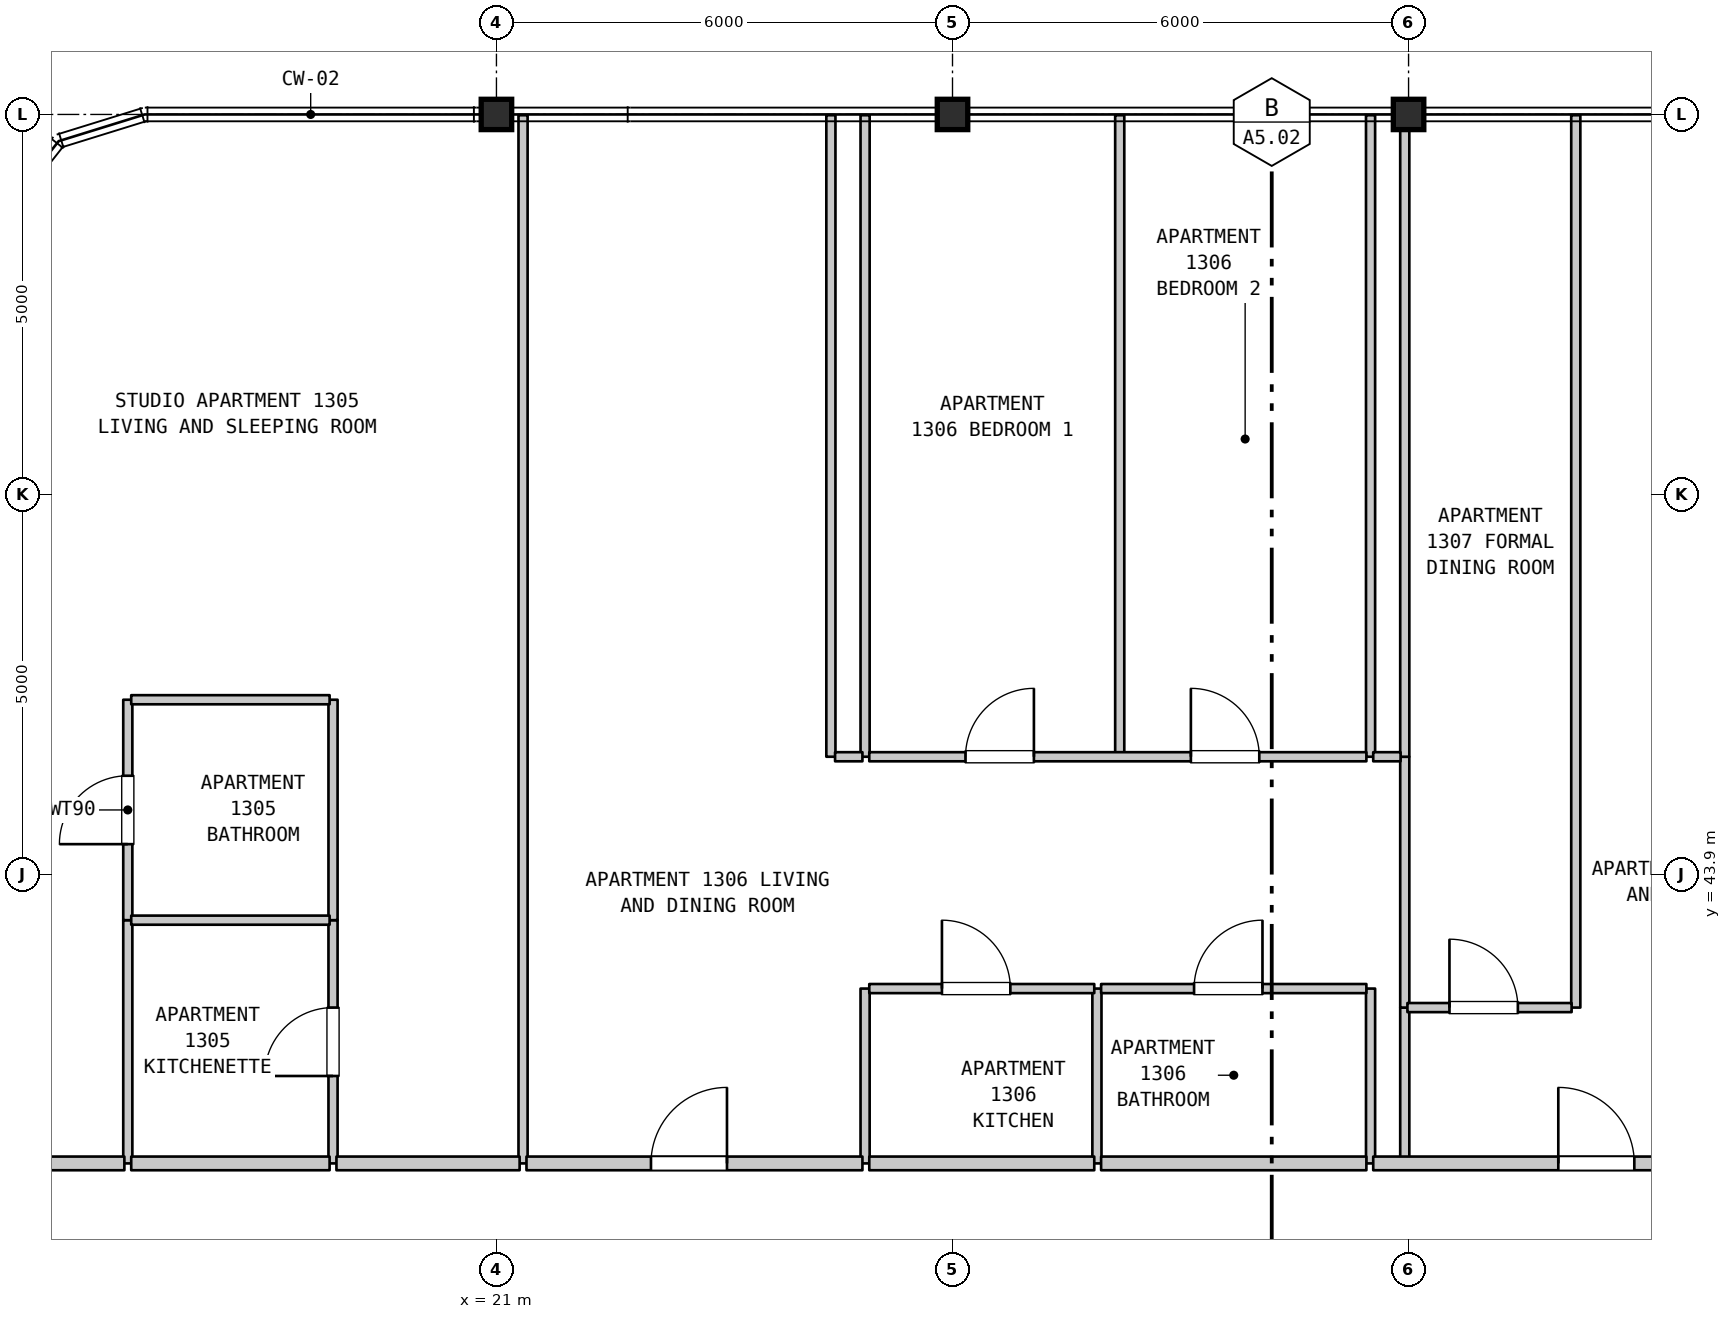
"""IFC4 building model, lengths in metres.
Left out: names, types, materials, properties, quantities, classifications, styles, units other than length and angle.
Written with IfcOpenShell. Run it as: python <this file> out.ifc"""

import sys

from ifc_helpers import new_model, si_unit, direction, frame, frame_2d, origin, origin_2d, place, context, subcontext, project, spatial, rectangle, i_section, extrude, element, fill, save


model = new_model("IFC4")
c1 = context("Model", 3, precision=1e-05, world=origin(), true_north=direction((0.0, 1.0)))
c2 = subcontext(c1, "Body", "Model", "MODEL_VIEW")
j1 = project(units=[si_unit("LENGTHUNIT", "METRE"), si_unit("PLANEANGLEUNIT", "RADIAN")], contexts=[c1])
p1 = place(None, origin())
s1 = spatial("IfcSite", under=j1, at=p1, CompositionType="ELEMENT")
p2 = place(p1, origin())
s2 = spatial("IfcBuilding", under=s1, at=p2, CompositionType="ELEMENT")
p3 = place(p2, frame((0.0, 0.0, 57.3)))
s3 = spatial("IfcBuildingStorey", under=s2, at=p3, CompositionType="ELEMENT", Elevation=57.3)
for number, where, z_axis, x_axis in (
    (1, (21.0, 53.9, 0.0), (0.0, 0.0, 1.0), (1.0, 0.0, 0.0)),
    (2, (27.0, 53.9, 0.0), (0.0, 0.0, 1.0), (1.0, 0.0, 0.0)),
    (3, (33.0, 53.9, 0.0), (0.0, 0.0, 1.0), (1.0, 0.0, 0.0)),
):
    element("IfcColumn", number, at=place(p3, frame(where, z_axis=z_axis, x_axis=x_axis)), inside=s3, PredefinedType="COLUMN", context=c2, shape_type="SweptSolid", body=[
        extrude(i_section(OverallWidth=0.401, OverallDepth=0.399, WebThickness=0.025, FlangeThickness=0.04, FilletRadius=0.015, at=origin_2d()), origin(), (0.0, 0.0, 1.0), 3.7),
    ])
p4 = place(p3, frame((16.15, 40.1, 0.0), z_axis=(0.0, 0.0, 1.0), x_axis=(0.0, 1.0, 0.0)))
e4 = element("IfcWall", 4, at=p4, inside=s3, PredefinedType="PARTITIONING", context=c2, shape_type="SweptSolid", body=[
    extrude(rectangle(XDim=3.2, YDim=0.12, at=frame_2d((1.6, 0.0))), origin(), (0.0, 0.0, 1.0), 3.28),
])
p5 = place(p3, frame((16.15, 43.3, 0.0), z_axis=(0.0, 0.0, 1.0), x_axis=(0.0, 1.0, 0.0)))
e5 = element("IfcWall", 5, at=p5, inside=s3, PredefinedType="PARTITIONING", context=c2, shape_type="SweptSolid", body=[
    extrude(rectangle(XDim=2.9, YDim=0.12, at=frame_2d((1.45, 0.0))), origin(), (0.0, 0.0, 1.0), 3.28),
])
p6 = place(p5, frame((1.0, 0.0, 0.0)))
e6 = element("IfcOpeningElement", 6, at=p6, cuts=e5, PredefinedType="OPENING", context=c2, shape_type="SweptSolid", body=[
    extrude(rectangle(XDim=0.9, YDim=2.1, at=frame_2d((0.45, 1.05))), frame((0.0, 0.07, 0.0), z_axis=(0.0, -1.0, 0.0), x_axis=(1.0, 0.0, 0.0)), (0.0, 0.0, 1.0), 0.14),
])
p7 = place(p3, frame((18.85, 40.1, 0.0), z_axis=(0.0, 0.0, 1.0), x_axis=(0.0, 1.0, 0.0)))
e7 = element("IfcWall", 7, at=p7, inside=s3, PredefinedType="PARTITIONING", context=c2, shape_type="SweptSolid", body=[
    extrude(rectangle(XDim=3.2, YDim=0.12, at=frame_2d((1.6, 0.0))), origin(), (0.0, 0.0, 1.0), 3.28),
])
p8 = place(p7, frame((1.15, 0.0, 0.0)))
e8 = element("IfcOpeningElement", 8, at=p8, cuts=e7, PredefinedType="OPENING", context=c2, shape_type="SweptSolid", body=[
    extrude(rectangle(XDim=0.9, YDim=2.15, at=frame_2d((0.45, 1.075))), frame((0.0, 0.07, 0.0), z_axis=(0.0, -1.0, 0.0), x_axis=(1.0, 0.0, 0.0)), (0.0, 0.0, 1.0), 0.14),
])
p9 = place(p3, frame((18.85, 43.3, 0.0), z_axis=(0.0, 0.0, 1.0), x_axis=(0.0, 1.0, 0.0)))
e9 = element("IfcWall", 9, at=p9, inside=s3, PredefinedType="PARTITIONING", context=c2, shape_type="SweptSolid", body=[
    extrude(rectangle(XDim=2.9, YDim=0.12, at=frame_2d((1.45, 0.0))), origin(), (0.0, 0.0, 1.0), 3.28),
])
p10 = place(p3, frame((21.35, 40.1, 0.0), z_axis=(0.0, 0.0, 1.0), x_axis=(0.0, 1.0, 0.0)))
e10 = element("IfcWall", 10, at=p10, inside=s3, PredefinedType="PARTITIONING", context=c2, shape_type="SweptSolid", body=[
    extrude(rectangle(XDim=13.79, YDim=0.12, at=frame_2d((6.895, 0.0))), origin(), (0.0, 0.0, 1.0), 3.28),
])
p11 = place(p3, frame((25.4, 45.45, 0.0), z_axis=(0.0, 0.0, 1.0), x_axis=(0.0, 1.0, 0.0)))
e11 = element("IfcWall", 11, at=p11, inside=s3, PredefinedType="PARTITIONING", context=c2, shape_type="SweptSolid", body=[
    extrude(rectangle(XDim=8.44, YDim=0.12, at=frame_2d((4.22, 0.0))), origin(), (0.0, 0.0, 1.0), 3.28),
])
p12 = place(p3, frame((25.85, 40.1, 0.0), z_axis=(0.0, 0.0, 1.0), x_axis=(0.0, 1.0, 0.0)))
e12 = element("IfcWall", 12, at=p12, inside=s3, PredefinedType="PARTITIONING", context=c2, shape_type="SweptSolid", body=[
    extrude(rectangle(XDim=2.3, YDim=0.12, at=frame_2d((1.15, 0.0))), origin(), (0.0, 0.0, 1.0), 3.28),
])
p13 = place(p3, frame((25.85, 45.45, 0.0), z_axis=(0.0, 0.0, 1.0), x_axis=(0.0, 1.0, 0.0)))
e13 = element("IfcWall", 13, at=p13, inside=s3, PredefinedType="PARTITIONING", context=c2, shape_type="SweptSolid", body=[
    extrude(rectangle(XDim=8.44, YDim=0.12, at=frame_2d((4.22, 0.0))), origin(), (0.0, 0.0, 1.0), 3.28),
])
p14 = place(p3, frame((28.9, 40.1, 0.0), z_axis=(0.0, 0.0, 1.0), x_axis=(0.0, 1.0, 0.0)))
e14 = element("IfcWall", 14, at=p14, inside=s3, PredefinedType="PARTITIONING", context=c2, shape_type="SweptSolid", body=[
    extrude(rectangle(XDim=2.3, YDim=0.12, at=frame_2d((1.15, 0.0))), origin(), (0.0, 0.0, 1.0), 3.28),
])
p15 = place(p3, frame((29.2, 45.45, 0.0), z_axis=(0.0, 0.0, 1.0), x_axis=(0.0, 1.0, 0.0)))
e15 = element("IfcWall", 15, at=p15, inside=s3, PredefinedType="PARTITIONING", context=c2, shape_type="SweptSolid", body=[
    extrude(rectangle(XDim=8.44, YDim=0.12, at=frame_2d((4.22, 0.0))), origin(), (0.0, 0.0, 1.0), 3.28),
])
p16 = place(p3, frame((32.5, 40.1, 0.0), z_axis=(0.0, 0.0, 1.0), x_axis=(0.0, 1.0, 0.0)))
e16 = element("IfcWall", 16, at=p16, inside=s3, PredefinedType="PARTITIONING", context=c2, shape_type="SweptSolid", body=[
    extrude(rectangle(XDim=2.3, YDim=0.12, at=frame_2d((1.15, 0.0))), origin(), (0.0, 0.0, 1.0), 3.28),
])
p17 = place(p3, frame((32.5, 45.45, 0.0), z_axis=(0.0, 0.0, 1.0), x_axis=(0.0, 1.0, 0.0)))
e17 = element("IfcWall", 17, at=p17, inside=s3, PredefinedType="PARTITIONING", context=c2, shape_type="SweptSolid", body=[
    extrude(rectangle(XDim=8.44, YDim=0.12, at=frame_2d((4.22, 0.0))), origin(), (0.0, 0.0, 1.0), 3.28),
])
p18 = place(p3, frame((32.95, 40.1, 0.0), z_axis=(0.0, 0.0, 1.0), x_axis=(0.0, 1.0, 0.0)))
e18 = element("IfcWall", 18, at=p18, inside=s3, PredefinedType="PARTITIONING", context=c2, shape_type="SweptSolid", body=[
    extrude(rectangle(XDim=2.05, YDim=0.12, at=frame_2d((1.025, 0.0))), origin(), (0.0, 0.0, 1.0), 2.68),
])
p19 = place(p3, frame((32.95, 42.15, 0.0), z_axis=(0.0, 0.0, 1.0), x_axis=(0.0, 1.0, 0.0)))
e19 = element("IfcWall", 19, at=p19, inside=s3, PredefinedType="PARTITIONING", context=c2, shape_type="SweptSolid", body=[
    extrude(rectangle(XDim=3.3, YDim=0.12, at=frame_2d((1.65, 0.0))), origin(), (0.0, 0.0, 1.0), 2.68),
])
p20 = place(p3, frame((32.95, 45.45, 0.0), z_axis=(0.0, 0.0, 1.0), x_axis=(0.0, 1.0, 0.0)))
e20 = element("IfcWall", 20, at=p20, inside=s3, PredefinedType="PARTITIONING", context=c2, shape_type="SweptSolid", body=[
    extrude(rectangle(XDim=8.44, YDim=0.12, at=frame_2d((4.22, 0.0))), origin(), (0.0, 0.0, 1.0), 2.68),
])
p21 = place(p3, frame((35.2, 42.15, 0.0), z_axis=(0.0, 0.0, 1.0), x_axis=(0.0, 1.0, 0.0)))
e21 = element("IfcWall", 21, at=p21, inside=s3, PredefinedType="PARTITIONING", context=c2, shape_type="SweptSolid", body=[
    extrude(rectangle(XDim=11.74, YDim=0.12, at=frame_2d((5.87, 0.0))), origin(), (0.0, 0.0, 1.0), 3.28),
])
p22 = place(p3, frame((12.875, 40.1, 0.0), z_axis=(0.0, 0.0, 1.0), x_axis=(1.0, 0.0, 0.0)))
e22 = element("IfcWall", 22, at=p22, inside=s3, PredefinedType="STANDARD", context=c2, shape_type="SweptSolid", body=[
    extrude(rectangle(XDim=3.23, YDim=0.18, at=frame_2d((1.615, 0.0))), origin(), (0.0, 0.0, 1.0), 3.28),
])
p23 = place(p22, frame((1.029, 0.0, 0.0)))
e23 = element("IfcOpeningElement", 23, at=p23, cuts=e22, PredefinedType="OPENING", context=c2, shape_type="SweptSolid", body=[
    extrude(rectangle(XDim=1.0, YDim=2.15, at=frame_2d((0.5, 1.075))), frame((0.0, 0.1, 0.0), z_axis=(0.0, -1.0, 0.0), x_axis=(1.0, 0.0, 0.0)), (0.0, 0.0, 1.0), 0.2),
])
p24 = place(p3, frame((16.195, 40.1, 0.0), z_axis=(0.0, 0.0, 1.0), x_axis=(1.0, 0.0, 0.0)))
e24 = element("IfcWall", 24, at=p24, inside=s3, PredefinedType="STANDARD", context=c2, shape_type="SweptSolid", body=[
    extrude(rectangle(XDim=2.61, YDim=0.18, at=frame_2d((1.305, 0.0))), origin(), (0.0, 0.0, 1.0), 3.28),
])
p25 = place(p3, frame((18.895, 40.1, 0.0), z_axis=(0.0, 0.0, 1.0), x_axis=(1.0, 0.0, 0.0)))
e25 = element("IfcWall", 25, at=p25, inside=s3, PredefinedType="STANDARD", context=c2, shape_type="SweptSolid", body=[
    extrude(rectangle(XDim=2.41, YDim=0.18, at=frame_2d((1.205, 0.0))), origin(), (0.0, 0.0, 1.0), 3.28),
])
p26 = place(p3, frame((21.395, 40.1, 0.0), z_axis=(0.0, 0.0, 1.0), x_axis=(1.0, 0.0, 0.0)))
e26 = element("IfcWall", 26, at=p26, inside=s3, PredefinedType="STANDARD", context=c2, shape_type="SweptSolid", body=[
    extrude(rectangle(XDim=4.42, YDim=0.18, at=frame_2d((2.21, 0.0))), origin(), (0.0, 0.0, 1.0), 3.28),
])
p27 = place(p26, frame((1.638, 0.0, 0.0)))
e27 = element("IfcOpeningElement", 27, at=p27, cuts=e26, PredefinedType="OPENING", context=c2, shape_type="SweptSolid", body=[
    extrude(rectangle(XDim=1.0, YDim=2.15, at=frame_2d((0.5, 1.075))), frame((0.0, 0.1, 0.0), z_axis=(0.0, -1.0, 0.0), x_axis=(1.0, 0.0, 0.0)), (0.0, 0.0, 1.0), 0.2),
])
p28 = place(p3, frame((25.905, 40.1, 0.0), z_axis=(0.0, 0.0, 1.0), x_axis=(1.0, 0.0, 0.0)))
e28 = element("IfcWall", 28, at=p28, inside=s3, PredefinedType="STANDARD", context=c2, shape_type="SweptSolid", body=[
    extrude(rectangle(XDim=2.96, YDim=0.18, at=frame_2d((1.48, 0.0))), origin(), (0.0, 0.0, 1.0), 3.28),
])
p29 = place(p3, frame((28.955, 40.1, 0.0), z_axis=(0.0, 0.0, 1.0), x_axis=(1.0, 0.0, 0.0)))
e29 = element("IfcWall", 29, at=p29, inside=s3, PredefinedType="STANDARD", context=c2, shape_type="SweptSolid", body=[
    extrude(rectangle(XDim=3.49, YDim=0.18, at=frame_2d((1.745, 0.0))), origin(), (0.0, 0.0, 1.0), 3.28),
])
p30 = place(p3, frame((32.535, 40.1, 0.0), z_axis=(0.0, 0.0, 1.0), x_axis=(1.0, 0.0, 0.0)))
e30 = element("IfcWall", 30, at=p30, inside=s3, PredefinedType="STANDARD", context=c2, shape_type="SweptSolid", body=[
    extrude(rectangle(XDim=5.545, YDim=0.18, at=frame_2d((2.772, 0.0))), origin(), (0.0, 0.0, 1.0), 3.28),
])
p31 = place(p30, frame((2.435, 0.0, 0.0)))
e31 = element("IfcOpeningElement", 31, at=p31, cuts=e30, PredefinedType="OPENING", context=c2, shape_type="SweptSolid", body=[
    extrude(rectangle(XDim=1.0, YDim=2.15, at=frame_2d((0.5, 1.075))), frame((0.0, 0.1, 0.0), z_axis=(0.0, -1.0, 0.0), x_axis=(1.0, 0.0, 0.0)), (0.0, 0.0, 1.0), 0.2),
])
p32 = place(p3, frame((32.985, 42.15, 0.0), z_axis=(0.0, 0.0, 1.0), x_axis=(1.0, 0.0, 0.0)))
e32 = element("IfcWall", 32, at=p32, inside=s3, PredefinedType="PARTITIONING", context=c2, shape_type="SweptSolid", body=[
    extrude(rectangle(XDim=2.16, YDim=0.12, at=frame_2d((1.08, 0.0))), origin(), (0.0, 0.0, 1.0), 3.28),
])
p33 = place(p32, frame((0.553, 0.0, 0.0)))
e33 = element("IfcOpeningElement", 33, at=p33, cuts=e32, PredefinedType="OPENING", context=c2, shape_type="SweptSolid", body=[
    extrude(rectangle(XDim=0.9, YDim=2.15, at=frame_2d((0.45, 1.075))), frame((0.0, 0.07, 0.0), z_axis=(0.0, -1.0, 0.0), x_axis=(1.0, 0.0, 0.0)), (0.0, 0.0, 1.0), 0.14),
])
p34 = place(p3, frame((25.905, 42.4, 0.0), z_axis=(0.0, 0.0, 1.0), x_axis=(1.0, 0.0, 0.0)))
e34 = element("IfcWall", 34, at=p34, inside=s3, PredefinedType="PARTITIONING", context=c2, shape_type="SweptSolid", body=[
    extrude(rectangle(XDim=2.96, YDim=0.12, at=frame_2d((1.48, 0.0))), origin(), (0.0, 0.0, 1.0), 3.28),
])
p35 = place(p34, frame((0.956, 0.0, 0.0)))
e35 = element("IfcOpeningElement", 35, at=p35, cuts=e34, PredefinedType="OPENING", context=c2, shape_type="SweptSolid", body=[
    extrude(rectangle(XDim=0.9, YDim=2.15, at=frame_2d((0.45, 1.075))), frame((0.0, 0.07, 0.0), z_axis=(0.0, -1.0, 0.0), x_axis=(1.0, 0.0, 0.0)), (0.0, 0.0, 1.0), 0.14),
])
p36 = place(p3, frame((28.955, 42.4, 0.0), z_axis=(0.0, 0.0, 1.0), x_axis=(1.0, 0.0, 0.0)))
e36 = element("IfcWall", 36, at=p36, inside=s3, PredefinedType="PARTITIONING", context=c2, shape_type="SweptSolid", body=[
    extrude(rectangle(XDim=3.49, YDim=0.12, at=frame_2d((1.745, 0.0))), origin(), (0.0, 0.0, 1.0), 3.28),
])
p37 = place(p36, frame((1.223, 0.0, 0.0)))
e37 = element("IfcOpeningElement", 37, at=p37, cuts=e36, PredefinedType="OPENING", context=c2, shape_type="SweptSolid", body=[
    extrude(rectangle(XDim=0.9, YDim=2.1, at=frame_2d((0.45, 1.05))), frame((0.0, 0.07, 0.0), z_axis=(0.0, -1.0, 0.0), x_axis=(1.0, 0.0, 0.0)), (0.0, 0.0, 1.0), 0.14),
])
p38 = place(p3, frame((16.195, 43.3, 0.0), z_axis=(0.0, 0.0, 1.0), x_axis=(1.0, 0.0, 0.0)))
e38 = element("IfcWall", 38, at=p38, inside=s3, PredefinedType="PARTITIONING", context=c2, shape_type="SweptSolid", body=[
    extrude(rectangle(XDim=2.61, YDim=0.12, at=frame_2d((1.305, 0.0))), origin(), (0.0, 0.0, 1.0), 3.28),
])
p39 = place(p3, frame((25.455, 45.45, 0.0), z_axis=(0.0, 0.0, 1.0), x_axis=(1.0, 0.0, 0.0)))
e39 = element("IfcWall", 39, at=p39, inside=s3, PredefinedType="PARTITIONING", context=c2, shape_type="SweptSolid", body=[
    extrude(rectangle(XDim=0.36, YDim=0.12, at=frame_2d((0.18, 0.0))), origin(), (0.0, 0.0, 1.0), 3.28),
])
p40 = place(p3, frame((25.905, 45.45, 0.0), z_axis=(0.0, 0.0, 1.0), x_axis=(1.0, 0.0, 0.0)))
e40 = element("IfcWall", 40, at=p40, inside=s3, PredefinedType="PARTITIONING", context=c2, shape_type="SweptSolid", body=[
    extrude(rectangle(XDim=6.54, YDim=0.12, at=frame_2d((3.27, 0.0))), origin(), (0.0, 0.0, 1.0), 3.28),
])
p41 = place(p40, frame((1.266, 0.0, 0.0)))
e41 = element("IfcOpeningElement", 41, at=p41, cuts=e40, PredefinedType="OPENING", context=c2, shape_type="SweptSolid", body=[
    extrude(rectangle(XDim=0.9, YDim=2.15, at=frame_2d((0.45, 1.075))), frame((0.0, 0.07, 0.0), z_axis=(0.0, -1.0, 0.0), x_axis=(1.0, 0.0, 0.0)), (0.0, 0.0, 1.0), 0.14),
])
p42 = place(p40, frame((4.231, 0.0, 0.0)))
e42 = element("IfcOpeningElement", 42, at=p42, cuts=e40, PredefinedType="OPENING", context=c2, shape_type="SweptSolid", body=[
    extrude(rectangle(XDim=0.9, YDim=2.15, at=frame_2d((0.45, 1.075))), frame((0.0, 0.07, 0.0), z_axis=(0.0, -1.0, 0.0), x_axis=(1.0, 0.0, 0.0)), (0.0, 0.0, 1.0), 0.14),
])
p43 = place(p3, frame((32.535, 45.45, 0.0), z_axis=(0.0, 0.0, 1.0), x_axis=(1.0, 0.0, 0.0)))
e43 = element("IfcWall", 43, at=p43, inside=s3, PredefinedType="PARTITIONING", context=c2, shape_type="SweptSolid", body=[
    extrude(rectangle(XDim=0.36, YDim=0.12, at=frame_2d((0.18, 0.0))), origin(), (0.0, 0.0, 1.0), 3.28),
])
p44 = place(p3, frame((16.195, 46.2, 0.0), z_axis=(0.0, 0.0, 1.0), x_axis=(1.0, 0.0, 0.0)))
e44 = element("IfcWall", 44, at=p44, inside=s3, PredefinedType="PARTITIONING", context=c2, shape_type="SweptSolid", body=[
    extrude(rectangle(XDim=2.61, YDim=0.12, at=frame_2d((1.305, 0.0))), origin(), (0.0, 0.0, 1.0), 3.28),
])
p45 = place(p6, origin())
e45 = element("IfcDoor", 45, at=p45, inside=s3, OperationType="SINGLE_SWING_LEFT", PredefinedType="DOOR", context=c2, shape_type="SweptSolid", body=[
    extrude(rectangle(XDim=0.9, YDim=2.1, at=frame_2d((0.45, 1.05))), frame((0.0, 0.025, 0.0), z_axis=(0.0, -1.0, 0.0), x_axis=(1.0, 0.0, 0.0)), (0.0, 0.0, 1.0), 0.05),
])
fill(e6, e45)
p46 = place(p8, origin())
e46 = element("IfcDoor", 46, at=p46, inside=s3, OperationType="SINGLE_SWING_LEFT", PredefinedType="DOOR", context=c2, shape_type="SweptSolid", body=[
    extrude(rectangle(XDim=0.9, YDim=2.15, at=frame_2d((0.45, 1.075))), frame((0.0, 0.025, 0.0), z_axis=(0.0, -1.0, 0.0), x_axis=(1.0, 0.0, 0.0)), (0.0, 0.0, 1.0), 0.05),
])
fill(e8, e46)
p47 = place(p27, origin())
e47 = element("IfcDoor", 47, at=p47, inside=s3, OperationType="SINGLE_SWING_RIGHT", PredefinedType="DOOR", context=c2, shape_type="SweptSolid", body=[
    extrude(rectangle(XDim=1.0, YDim=2.15, at=frame_2d((0.5, 1.075))), frame((0.0, 0.025, 0.0), z_axis=(0.0, -1.0, 0.0), x_axis=(1.0, 0.0, 0.0)), (0.0, 0.0, 1.0), 0.05),
])
fill(e27, e47)
p48 = place(p31, origin())
e48 = element("IfcDoor", 48, at=p48, inside=s3, OperationType="SINGLE_SWING_LEFT", PredefinedType="DOOR", context=c2, shape_type="SweptSolid", body=[
    extrude(rectangle(XDim=1.0, YDim=2.15, at=frame_2d((0.5, 1.075))), frame((0.0, 0.025, 0.0), z_axis=(0.0, -1.0, 0.0), x_axis=(1.0, 0.0, 0.0)), (0.0, 0.0, 1.0), 0.05),
])
fill(e31, e48)
p49 = place(p33, origin())
e49 = element("IfcDoor", 49, at=p49, inside=s3, OperationType="SINGLE_SWING_LEFT", PredefinedType="DOOR", context=c2, shape_type="SweptSolid", body=[
    extrude(rectangle(XDim=0.9, YDim=2.15, at=frame_2d((0.45, 1.075))), frame((0.0, 0.025, 0.0), z_axis=(0.0, -1.0, 0.0), x_axis=(1.0, 0.0, 0.0)), (0.0, 0.0, 1.0), 0.05),
])
fill(e33, e49)
p50 = place(p35, origin())
e50 = element("IfcDoor", 50, at=p50, inside=s3, OperationType="SINGLE_SWING_LEFT", PredefinedType="DOOR", context=c2, shape_type="SweptSolid", body=[
    extrude(rectangle(XDim=0.9, YDim=2.15, at=frame_2d((0.45, 1.075))), frame((0.0, 0.025, 0.0), z_axis=(0.0, -1.0, 0.0), x_axis=(1.0, 0.0, 0.0)), (0.0, 0.0, 1.0), 0.05),
])
fill(e35, e50)
p51 = place(p37, origin())
e51 = element("IfcDoor", 51, at=p51, inside=s3, OperationType="SINGLE_SWING_RIGHT", PredefinedType="DOOR", context=c2, shape_type="SweptSolid", body=[
    extrude(rectangle(XDim=0.9, YDim=2.1, at=frame_2d((0.45, 1.05))), frame((0.0, 0.025, 0.0), z_axis=(0.0, -1.0, 0.0), x_axis=(1.0, 0.0, 0.0)), (0.0, 0.0, 1.0), 0.05),
])
fill(e37, e51)
p52 = place(p41, origin())
e52 = element("IfcDoor", 52, at=p52, inside=s3, OperationType="SINGLE_SWING_RIGHT", PredefinedType="DOOR", context=c2, shape_type="SweptSolid", body=[
    extrude(rectangle(XDim=0.9, YDim=2.15, at=frame_2d((0.45, 1.075))), frame((0.0, 0.025, 0.0), z_axis=(0.0, -1.0, 0.0), x_axis=(1.0, 0.0, 0.0)), (0.0, 0.0, 1.0), 0.05),
])
fill(e41, e52)
p53 = place(p42, origin())
e53 = element("IfcDoor", 53, at=p53, inside=s3, OperationType="SINGLE_SWING_LEFT", PredefinedType="DOOR", context=c2, shape_type="SweptSolid", body=[
    extrude(rectangle(XDim=0.9, YDim=2.15, at=frame_2d((0.45, 1.075))), frame((0.0, 0.025, 0.0), z_axis=(0.0, -1.0, 0.0), x_axis=(1.0, 0.0, 0.0)), (0.0, 0.0, 1.0), 0.05),
])
fill(e42, e53)
save(model, sys.argv[1])
